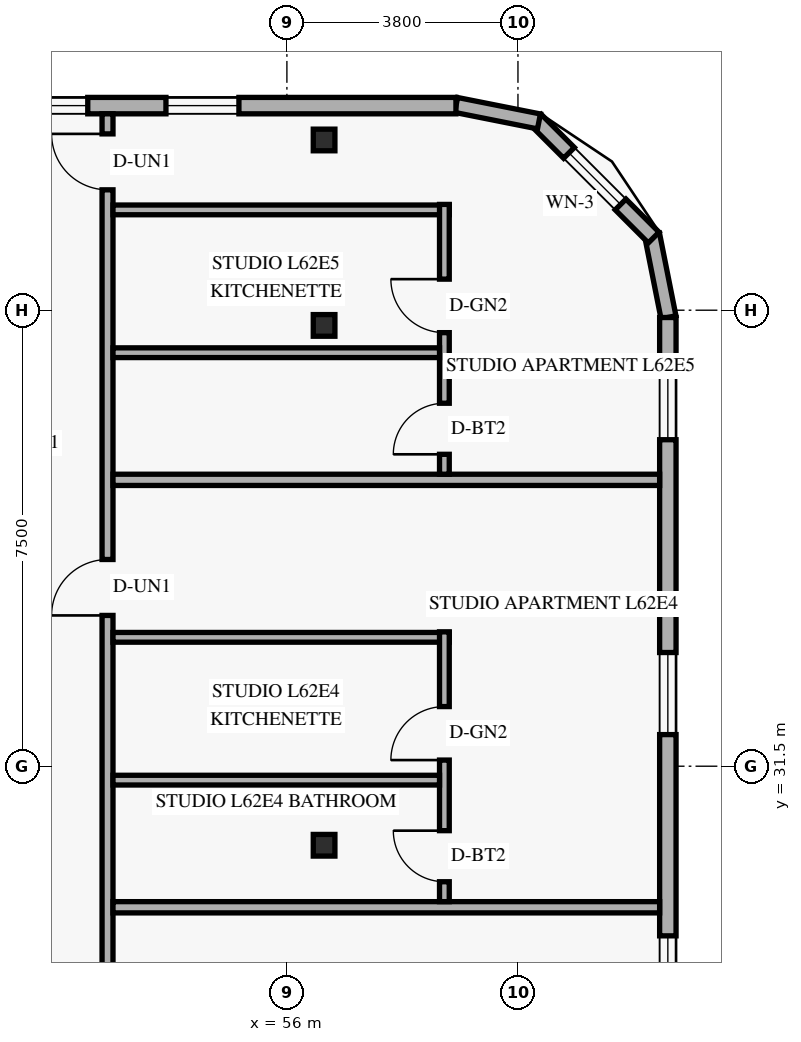
"""IFC4 building model, lengths in metres.
Left out: names, types, materials, properties, quantities, classifications, styles, units other than length and angle.
Written with IfcOpenShell. Run it as: python <this file> out.ifc"""

import sys

from ifc_helpers import new_model, si_unit, direction, frame, frame_2d, origin, origin_2d, place, context, subcontext, project, spatial, rectangle, hollow_rectangle, extrude, element, fill, save


model = new_model("IFC4")
c1 = context("Model", 3, precision=1e-05, world=origin(), true_north=direction((0.0, 1.0)))
c2 = subcontext(c1, "Body", "Model", "MODEL_VIEW")
j1 = project(units=[si_unit("LENGTHUNIT", "METRE"), si_unit("PLANEANGLEUNIT", "RADIAN")], contexts=[c1])
p1 = place(None, origin())
s1 = spatial("IfcSite", under=j1, at=p1, CompositionType="ELEMENT")
p2 = place(p1, origin())
s2 = spatial("IfcBuilding", under=s1, at=p2, CompositionType="ELEMENT")
p3 = place(p2, frame((0.0, 0.0, 238.8)))
s3 = spatial("IfcBuildingStorey", under=s2, at=p3, CompositionType="ELEMENT", Elevation=238.8)
for number, where, z_axis, x_axis in (
    (1, (56.507, 30.2, 0.0), (0.058, 0.0, 0.998), (0.0, 1.0, 0.0)),
    (2, (56.507, 38.75, 0.0), (0.058, 0.0, 0.998), (0.0, 1.0, 0.0)),
    (3, (56.507, 41.8, 0.0), (0.058, 0.0, 0.998), (0.0, 1.0, 0.0)),
):
    element("IfcColumn", number, at=place(p3, frame(where, z_axis=z_axis, x_axis=x_axis)), inside=s3, PredefinedType="COLUMN", context=c2, shape_type="SweptSolid", body=[
        extrude(hollow_rectangle(XDim=0.356, YDim=0.356, WallThickness=0.016, at=origin_2d()), origin(), (0.0, 0.0, 1.0), 3.606),
    ])
p4 = place(p3, frame((62.276, 38.884, 0.0), z_axis=(0.0, 0.0, 1.0), x_axis=(-0.195135625965, 0.9807762678, 0.0)))
e4 = element("IfcWall", 4, at=p4, inside=s3, PredefinedType="SOLIDWALL", context=c2, shape_type="SweptSolid", body=[
    extrude(rectangle(XDim=1.389, YDim=0.25, at=frame_2d((0.694, 0.0))), origin(), (0.0, 0.0, 1.0), 3.36),
])
p5 = place(p3, frame((62.032, 40.195, 0.0), z_axis=(0.0, 0.0, 1.0), x_axis=(-0.707106781187, 0.707106781187, 0.0)))
e5 = element("IfcWall", 5, at=p5, inside=s3, PredefinedType="SOLIDWALL", context=c2, shape_type="SweptSolid", body=[
    extrude(rectangle(XDim=2.739, YDim=0.25, at=frame_2d((1.37, 0.0))), origin(), (0.0, 0.0, 1.0), 3.36),
])
p6 = place(p5, frame((0.77, 0.0, 0.85)))
e6 = element("IfcOpeningElement", 6, at=p6, cuts=e5, PredefinedType="OPENING", context=c2, shape_type="SweptSolid", body=[
    extrude(rectangle(XDim=1.2, YDim=1.5, at=frame_2d((0.6, 0.75))), frame((0.0, 0.135, 0.0), z_axis=(0.0, -1.0, 0.0), x_axis=(1.0, 0.0, 0.0)), (0.0, 0.0, 1.0), 0.27),
])
p7 = place(p3, frame((60.146, 42.105, 0.0), z_axis=(0.0, 0.0, 1.0), x_axis=(-0.980809899341, 0.19496651342, 0.0)))
e7 = element("IfcWall", 7, at=p7, inside=s3, PredefinedType="SOLIDWALL", context=c2, shape_type="SweptSolid", body=[
    extrude(rectangle(XDim=1.389, YDim=0.25, at=frame_2d((0.694, 0.0))), origin(), (0.0, 0.0, 1.0), 3.36),
])
p8 = place(p3, frame((62.265, 9.12, 0.0), z_axis=(0.0, 0.0, 1.0), x_axis=(0.0, 1.0, 0.0)))
e8 = element("IfcWall", 8, at=p8, inside=s3, PredefinedType="SOLIDWALL", context=c2, shape_type="SweptSolid", body=[
    extrude(rectangle(XDim=29.76, YDim=0.27, at=frame_2d((14.88, 0.0))), origin(), (0.0, 0.0, 1.0), 3.36),
])
p9 = place(p8, frame((1.215, 0.0, 0.85)))
e9 = element("IfcOpeningElement", 9, at=p9, cuts=e8, PredefinedType="OPENING", context=c2, shape_type="SweptSolid", body=[
    extrude(rectangle(XDim=1.35, YDim=1.55, at=frame_2d((0.675, 0.775))), frame((0.0, 0.145, 0.0), z_axis=(0.0, -1.0, 0.0), x_axis=(1.0, 0.0, 0.0)), (0.0, 0.0, 1.0), 0.29),
])
p10 = place(p8, frame((7.175, 0.0, 0.85)))
e10 = element("IfcOpeningElement", 10, at=p10, cuts=e8, PredefinedType="OPENING", context=c2, shape_type="SweptSolid", body=[
    extrude(rectangle(XDim=1.35, YDim=1.55, at=frame_2d((0.675, 0.775))), frame((0.0, 0.145, 0.0), z_axis=(0.0, -1.0, 0.0), x_axis=(1.0, 0.0, 0.0)), (0.0, 0.0, 1.0), 0.29),
])
p11 = place(p8, frame((14.17, 0.0, 0.85)))
e11 = element("IfcOpeningElement", 11, at=p11, cuts=e8, PredefinedType="OPENING", context=c2, shape_type="SweptSolid", body=[
    extrude(rectangle(XDim=1.35, YDim=1.55, at=frame_2d((0.675, 0.775))), frame((0.0, 0.145, 0.0), z_axis=(0.0, -1.0, 0.0), x_axis=(1.0, 0.0, 0.0)), (0.0, 0.0, 1.0), 0.29),
])
p12 = place(p8, frame((18.24, 0.0, 0.85)))
e12 = element("IfcOpeningElement", 12, at=p12, cuts=e8, PredefinedType="OPENING", context=c2, shape_type="SweptSolid", body=[
    extrude(rectangle(XDim=1.35, YDim=1.55, at=frame_2d((0.675, 0.775))), frame((0.0, 0.145, 0.0), z_axis=(0.0, -1.0, 0.0), x_axis=(1.0, 0.0, 0.0)), (0.0, 0.0, 1.0), 0.29),
])
p13 = place(p8, frame((22.9, 0.0, 0.85)))
e13 = element("IfcOpeningElement", 13, at=p13, cuts=e8, PredefinedType="OPENING", context=c2, shape_type="SweptSolid", body=[
    extrude(rectangle(XDim=1.35, YDim=1.55, at=frame_2d((0.675, 0.775))), frame((0.0, 0.145, 0.0), z_axis=(0.0, -1.0, 0.0), x_axis=(1.0, 0.0, 0.0)), (0.0, 0.0, 1.0), 0.29),
])
p14 = place(p8, frame((27.75, 0.0, 0.85)))
e14 = element("IfcOpeningElement", 14, at=p14, cuts=e8, PredefinedType="OPENING", context=c2, shape_type="SweptSolid", body=[
    extrude(rectangle(XDim=1.35, YDim=1.55, at=frame_2d((0.675, 0.775))), frame((0.0, 0.145, 0.0), z_axis=(0.0, -1.0, 0.0), x_axis=(1.0, 0.0, 0.0)), (0.0, 0.0, 1.0), 0.29),
])
p15 = place(p3, frame((58.78, 42.365, 0.0), z_axis=(0.0, 0.0, 1.0), x_axis=(-1.0, 0.0, 0.0)))
e15 = element("IfcWall", 15, at=p15, inside=s3, PredefinedType="SOLIDWALL", context=c2, shape_type="SweptSolid", body=[
    extrude(rectangle(XDim=32.96, YDim=0.27, at=frame_2d((16.48, 0.0))), origin(), (0.0, 0.0, 1.0), 3.36),
])
p16 = place(p15, frame((18.035, 0.0, 0.85)))
e16 = element("IfcOpeningElement", 16, at=p16, cuts=e15, PredefinedType="OPENING", context=c2, shape_type="SweptSolid", body=[
    extrude(rectangle(XDim=1.2, YDim=1.5, at=frame_2d((0.6, 0.75))), frame((0.0, 0.145, 0.0), z_axis=(0.0, -1.0, 0.0), x_axis=(1.0, 0.0, 0.0)), (0.0, 0.0, 1.0), 0.29),
])
p17 = place(p15, frame((11.896, 0.0, 0.85)))
e17 = element("IfcOpeningElement", 17, at=p17, cuts=e15, PredefinedType="OPENING", context=c2, shape_type="SweptSolid", body=[
    extrude(rectangle(XDim=1.2, YDim=1.5, at=frame_2d((0.6, 0.75))), frame((0.0, 0.145, 0.0), z_axis=(0.0, -1.0, 0.0), x_axis=(1.0, 0.0, 0.0)), (0.0, 0.0, 1.0), 0.29),
])
p18 = place(p15, frame((6.055, 0.0, 0.85)))
e18 = element("IfcOpeningElement", 18, at=p18, cuts=e15, PredefinedType="OPENING", context=c2, shape_type="SweptSolid", body=[
    extrude(rectangle(XDim=1.2, YDim=1.5, at=frame_2d((0.6, 0.75))), frame((0.0, 0.145, 0.0), z_axis=(0.0, -1.0, 0.0), x_axis=(1.0, 0.0, 0.0)), (0.0, 0.0, 1.0), 0.29),
])
p19 = place(p15, frame((3.569, 0.0, 0.85)))
e19 = element("IfcOpeningElement", 19, at=p19, cuts=e15, PredefinedType="OPENING", context=c2, shape_type="SweptSolid", body=[
    extrude(rectangle(XDim=1.2, YDim=1.5, at=frame_2d((0.6, 0.75))), frame((0.0, 0.145, 0.0), z_axis=(0.0, -1.0, 0.0), x_axis=(1.0, 0.0, 0.0)), (0.0, 0.0, 1.0), 0.29),
])
p20 = place(p3, frame((53.05, 5.77, 0.0), z_axis=(0.0, 0.0, 1.0), x_axis=(0.0, 1.0, 0.0)))
e20 = element("IfcWall", 20, at=p20, inside=s3, PredefinedType="STANDARD", context=c2, shape_type="SweptSolid", body=[
    extrude(rectangle(XDim=36.46, YDim=0.18, at=frame_2d((18.23, 0.0))), origin(), (0.0, 0.0, 1.0), 2.803),
])
p21 = place(p20, frame((1.357, 0.0, 0.0)))
e21 = element("IfcOpeningElement", 21, at=p21, cuts=e20, PredefinedType="OPENING", context=c2, shape_type="SweptSolid", body=[
    extrude(rectangle(XDim=0.92, YDim=2.15, at=frame_2d((0.46, 1.075))), frame((0.0, 0.1, 0.0), z_axis=(0.0, -1.0, 0.0), x_axis=(1.0, 0.0, 0.0)), (0.0, 0.0, 1.0), 0.2),
])
p22 = place(p20, frame((12.03, 0.0, 0.0)))
e22 = element("IfcOpeningElement", 22, at=p22, cuts=e20, PredefinedType="OPENING", context=c2, shape_type="SweptSolid", body=[
    extrude(rectangle(XDim=0.92, YDim=2.15, at=frame_2d((0.46, 1.075))), frame((0.0, 0.1, 0.0), z_axis=(0.0, -1.0, 0.0), x_axis=(1.0, 0.0, 0.0)), (0.0, 0.0, 1.0), 0.2),
])
p23 = place(p20, frame((20.27, 0.0, 0.0)))
e23 = element("IfcOpeningElement", 23, at=p23, cuts=e20, PredefinedType="OPENING", context=c2, shape_type="SweptSolid", body=[
    extrude(rectangle(XDim=0.92, YDim=2.15, at=frame_2d((0.46, 1.075))), frame((0.0, 0.1, 0.0), z_axis=(0.0, -1.0, 0.0), x_axis=(1.0, 0.0, 0.0)), (0.0, 0.0, 1.0), 0.2),
])
p24 = place(p20, frame((28.21, 0.0, 0.0)))
e24 = element("IfcOpeningElement", 24, at=p24, cuts=e20, PredefinedType="OPENING", context=c2, shape_type="SweptSolid", body=[
    extrude(rectangle(XDim=0.92, YDim=2.15, at=frame_2d((0.46, 1.075))), frame((0.0, 0.1, 0.0), z_axis=(0.0, -1.0, 0.0), x_axis=(1.0, 0.0, 0.0)), (0.0, 0.0, 1.0), 0.2),
])
p25 = place(p20, frame((35.21, 0.0, 0.0)))
e25 = element("IfcOpeningElement", 25, at=p25, cuts=e20, PredefinedType="OPENING", context=c2, shape_type="SweptSolid", body=[
    extrude(rectangle(XDim=0.92, YDim=2.15, at=frame_2d((0.46, 1.075))), frame((0.0, 0.1, 0.0), z_axis=(0.0, -1.0, 0.0), x_axis=(1.0, 0.0, 0.0)), (0.0, 0.0, 1.0), 0.2),
])
p26 = place(p3, frame((53.14, 29.18, 0.0), z_axis=(0.0, 0.0, 1.0), x_axis=(1.0, 0.0, 0.0)))
e26 = element("IfcWall", 26, at=p26, inside=s3, PredefinedType="PARTITIONING", context=c2, shape_type="SweptSolid", body=[
    extrude(rectangle(XDim=8.99, YDim=0.185, at=frame_2d((4.495, 0.0))), origin(), (0.0, 0.0, 1.0), 2.879),
])
p27 = place(p3, frame((53.14, 33.62, 0.0), z_axis=(0.0, 0.0, 1.0), x_axis=(1.0, 0.0, 0.0)))
e27 = element("IfcWall", 27, at=p27, inside=s3, PredefinedType="PLUMBINGWALL", context=c2, shape_type="SweptSolid", body=[
    extrude(rectangle(XDim=5.53, YDim=0.16, at=frame_2d((2.765, 0.0))), origin(), (0.0, 0.0, 1.0), 2.879),
])
p28 = place(p3, frame((58.59, 29.272, 0.0), z_axis=(0.0, 0.0, 1.0), x_axis=(0.0, 1.0, 0.0)))
e28 = element("IfcWall", 28, at=p28, inside=s3, PredefinedType="PLUMBINGWALL", context=c2, shape_type="SweptSolid", body=[
    extrude(rectangle(XDim=4.438, YDim=0.16, at=frame_2d((2.219, 0.0))), origin(), (0.0, 0.0, 1.0), 3.36),
])
p29 = place(p28, frame((0.327, 0.0, 0.0)))
e29 = element("IfcOpeningElement", 29, at=p29, cuts=e28, PredefinedType="OPENING", context=c2, shape_type="SweptSolid", body=[
    extrude(rectangle(XDim=0.84, YDim=2.12, at=frame_2d((0.42, 1.06))), frame((0.0, 0.09, 0.0), z_axis=(0.0, -1.0, 0.0), x_axis=(1.0, 0.0, 0.0)), (0.0, 0.0, 1.0), 0.18),
])
p30 = place(p28, frame((2.329, 0.0, 0.0)))
e30 = element("IfcOpeningElement", 30, at=p30, cuts=e28, PredefinedType="OPENING", context=c2, shape_type="SweptSolid", body=[
    extrude(rectangle(XDim=0.88, YDim=2.12, at=frame_2d((0.44, 1.06))), frame((0.0, 0.09, 0.0), z_axis=(0.0, -1.0, 0.0), x_axis=(1.0, 0.0, 0.0)), (0.0, 0.0, 1.0), 0.18),
])
p31 = place(p3, frame((53.14, 31.271, 0.0), z_axis=(0.0, 0.0, 1.0), x_axis=(1.0, 0.0, 0.0)))
e31 = element("IfcWall", 31, at=p31, inside=s3, PredefinedType="PLUMBINGWALL", context=c2, shape_type="SweptSolid", body=[
    extrude(rectangle(XDim=5.37, YDim=0.16, at=frame_2d((2.685, 0.0))), origin(), (0.0, 0.0, 1.0), 2.879),
])
p32 = place(p3, frame((53.14, 36.21, 0.0), z_axis=(0.0, 0.0, 1.0), x_axis=(1.0, 0.0, 0.0)))
e32 = element("IfcWall", 32, at=p32, inside=s3, PredefinedType="PARTITIONING", context=c2, shape_type="SweptSolid", body=[
    extrude(rectangle(XDim=8.99, YDim=0.185, at=frame_2d((4.495, 0.0))), origin(), (0.0, 0.0, 1.0), 2.879),
])
p33 = place(p3, frame((53.14, 40.65, 0.0), z_axis=(0.0, 0.0, 1.0), x_axis=(1.0, 0.0, 0.0)))
e33 = element("IfcWall", 33, at=p33, inside=s3, PredefinedType="PLUMBINGWALL", context=c2, shape_type="SweptSolid", body=[
    extrude(rectangle(XDim=5.53, YDim=0.16, at=frame_2d((2.765, 0.0))), origin(), (0.0, 0.0, 1.0), 2.879),
])
p34 = place(p3, frame((58.59, 36.302, 0.0), z_axis=(0.0, 0.0, 1.0), x_axis=(0.0, 1.0, 0.0)))
e34 = element("IfcWall", 34, at=p34, inside=s3, PredefinedType="PLUMBINGWALL", context=c2, shape_type="SweptSolid", body=[
    extrude(rectangle(XDim=4.438, YDim=0.16, at=frame_2d((2.219, 0.0))), origin(), (0.0, 0.0, 1.0), 3.36),
])
p35 = place(p34, frame((0.327, 0.0, 0.0)))
e35 = element("IfcOpeningElement", 35, at=p35, cuts=e34, PredefinedType="OPENING", context=c2, shape_type="SweptSolid", body=[
    extrude(rectangle(XDim=0.84, YDim=2.12, at=frame_2d((0.42, 1.06))), frame((0.0, 0.09, 0.0), z_axis=(0.0, -1.0, 0.0), x_axis=(1.0, 0.0, 0.0)), (0.0, 0.0, 1.0), 0.18),
])
p36 = place(p34, frame((2.329, 0.0, 0.0)))
e36 = element("IfcOpeningElement", 36, at=p36, cuts=e34, PredefinedType="OPENING", context=c2, shape_type="SweptSolid", body=[
    extrude(rectangle(XDim=0.88, YDim=2.12, at=frame_2d((0.44, 1.06))), frame((0.0, 0.09, 0.0), z_axis=(0.0, -1.0, 0.0), x_axis=(1.0, 0.0, 0.0)), (0.0, 0.0, 1.0), 0.18),
])
p37 = place(p3, frame((53.14, 38.301, 0.0), z_axis=(0.0, 0.0, 1.0), x_axis=(1.0, 0.0, 0.0)))
e37 = element("IfcWall", 37, at=p37, inside=s3, PredefinedType="PLUMBINGWALL", context=c2, shape_type="SweptSolid", body=[
    extrude(rectangle(XDim=5.37, YDim=0.16, at=frame_2d((2.685, 0.0))), origin(), (0.0, 0.0, 1.0), 2.879),
])
p38 = place(p6, origin())
e38 = element("IfcWindow", 38, at=p38, inside=s3, PartitioningType="SINGLE_PANEL", PredefinedType="WINDOW", context=c2, shape_type="SweptSolid", body=[
    extrude(rectangle(XDim=1.2, YDim=1.5, at=frame_2d((0.6, 0.75))), frame((0.0, 0.03, 0.0), z_axis=(0.0, -1.0, 0.0), x_axis=(1.0, 0.0, 0.0)), (0.0, 0.0, 1.0), 0.06),
])
fill(e6, e38)
p39 = place(p12, origin())
e39 = element("IfcWindow", 39, at=p39, inside=s3, PartitioningType="SINGLE_PANEL", PredefinedType="WINDOW", context=c2, shape_type="SweptSolid", body=[
    extrude(rectangle(XDim=1.35, YDim=1.55, at=frame_2d((0.675, 0.775))), frame((0.0, 0.03, 0.0), z_axis=(0.0, -1.0, 0.0), x_axis=(1.0, 0.0, 0.0)), (0.0, 0.0, 1.0), 0.06),
])
fill(e12, e39)
p40 = place(p13, origin())
e40 = element("IfcWindow", 40, at=p40, inside=s3, PartitioningType="SINGLE_PANEL", PredefinedType="WINDOW", context=c2, shape_type="SweptSolid", body=[
    extrude(rectangle(XDim=1.35, YDim=1.55, at=frame_2d((0.675, 0.775))), frame((0.0, 0.03, 0.0), z_axis=(0.0, -1.0, 0.0), x_axis=(1.0, 0.0, 0.0)), (0.0, 0.0, 1.0), 0.06),
])
fill(e13, e40)
p41 = place(p14, origin())
e41 = element("IfcWindow", 41, at=p41, inside=s3, PartitioningType="SINGLE_PANEL", PredefinedType="WINDOW", context=c2, shape_type="SweptSolid", body=[
    extrude(rectangle(XDim=1.35, YDim=1.55, at=frame_2d((0.675, 0.775))), frame((0.0, 0.03, 0.0), z_axis=(0.0, -1.0, 0.0), x_axis=(1.0, 0.0, 0.0)), (0.0, 0.0, 1.0), 0.06),
])
fill(e14, e41)
p42 = place(p18, origin())
e42 = element("IfcWindow", 42, at=p42, inside=s3, PartitioningType="SINGLE_PANEL", PredefinedType="WINDOW", context=c2, shape_type="SweptSolid", body=[
    extrude(rectangle(XDim=1.2, YDim=1.5, at=frame_2d((0.6, 0.75))), frame((0.0, 0.03, 0.0), z_axis=(0.0, -1.0, 0.0), x_axis=(1.0, 0.0, 0.0)), (0.0, 0.0, 1.0), 0.06),
])
fill(e18, e42)
p43 = place(p19, origin())
e43 = element("IfcWindow", 43, at=p43, inside=s3, PartitioningType="SINGLE_PANEL", PredefinedType="WINDOW", context=c2, shape_type="SweptSolid", body=[
    extrude(rectangle(XDim=1.2, YDim=1.5, at=frame_2d((0.6, 0.75))), frame((0.0, 0.03, 0.0), z_axis=(0.0, -1.0, 0.0), x_axis=(1.0, 0.0, 0.0)), (0.0, 0.0, 1.0), 0.06),
])
fill(e19, e43)
p44 = place(p24, origin())
e44 = element("IfcDoor", 44, at=p44, inside=s3, OperationType="SINGLE_SWING_LEFT", PredefinedType="DOOR", context=c2, shape_type="SweptSolid", body=[
    extrude(rectangle(XDim=0.92, YDim=2.15, at=frame_2d((0.46, 1.075))), frame((0.0, 0.025, 0.0), z_axis=(0.0, -1.0, 0.0), x_axis=(1.0, 0.0, 0.0)), (0.0, 0.0, 1.0), 0.05),
])
fill(e24, e44)
p45 = place(p29, origin())
e45 = element("IfcDoor", 45, at=p45, inside=s3, OperationType="SINGLE_SWING_RIGHT", PredefinedType="DOOR", context=c2, shape_type="SweptSolid", body=[
    extrude(rectangle(XDim=0.84, YDim=2.12, at=frame_2d((0.42, 1.06))), frame((0.0, 0.025, 0.0), z_axis=(0.0, -1.0, 0.0), x_axis=(1.0, 0.0, 0.0)), (0.0, 0.0, 1.0), 0.05),
])
fill(e29, e45)
p46 = place(p30, origin())
e46 = element("IfcDoor", 46, at=p46, inside=s3, OperationType="SINGLE_SWING_LEFT", PredefinedType="DOOR", context=c2, shape_type="SweptSolid", body=[
    extrude(rectangle(XDim=0.88, YDim=2.12, at=frame_2d((0.44, 1.06))), frame((0.0, 0.025, 0.0), z_axis=(0.0, -1.0, 0.0), x_axis=(1.0, 0.0, 0.0)), (0.0, 0.0, 1.0), 0.05),
])
fill(e30, e46)
p47 = place(p25, origin())
e47 = element("IfcDoor", 47, at=p47, inside=s3, OperationType="SINGLE_SWING_RIGHT", PredefinedType="DOOR", context=c2, shape_type="SweptSolid", body=[
    extrude(rectangle(XDim=0.92, YDim=2.15, at=frame_2d((0.46, 1.075))), frame((0.0, 0.025, 0.0), z_axis=(0.0, -1.0, 0.0), x_axis=(1.0, 0.0, 0.0)), (0.0, 0.0, 1.0), 0.05),
])
fill(e25, e47)
p48 = place(p35, origin())
e48 = element("IfcDoor", 48, at=p48, inside=s3, OperationType="SINGLE_SWING_LEFT", PredefinedType="DOOR", context=c2, shape_type="SweptSolid", body=[
    extrude(rectangle(XDim=0.84, YDim=2.12, at=frame_2d((0.42, 1.06))), frame((0.0, 0.025, 0.0), z_axis=(0.0, -1.0, 0.0), x_axis=(1.0, 0.0, 0.0)), (0.0, 0.0, 1.0), 0.05),
])
fill(e35, e48)
p49 = place(p36, origin())
e49 = element("IfcDoor", 49, at=p49, inside=s3, OperationType="SINGLE_SWING_RIGHT", PredefinedType="DOOR", context=c2, shape_type="SweptSolid", body=[
    extrude(rectangle(XDim=0.88, YDim=2.12, at=frame_2d((0.44, 1.06))), frame((0.0, 0.025, 0.0), z_axis=(0.0, -1.0, 0.0), x_axis=(1.0, 0.0, 0.0)), (0.0, 0.0, 1.0), 0.05),
])
fill(e36, e49)
save(model, sys.argv[1])
